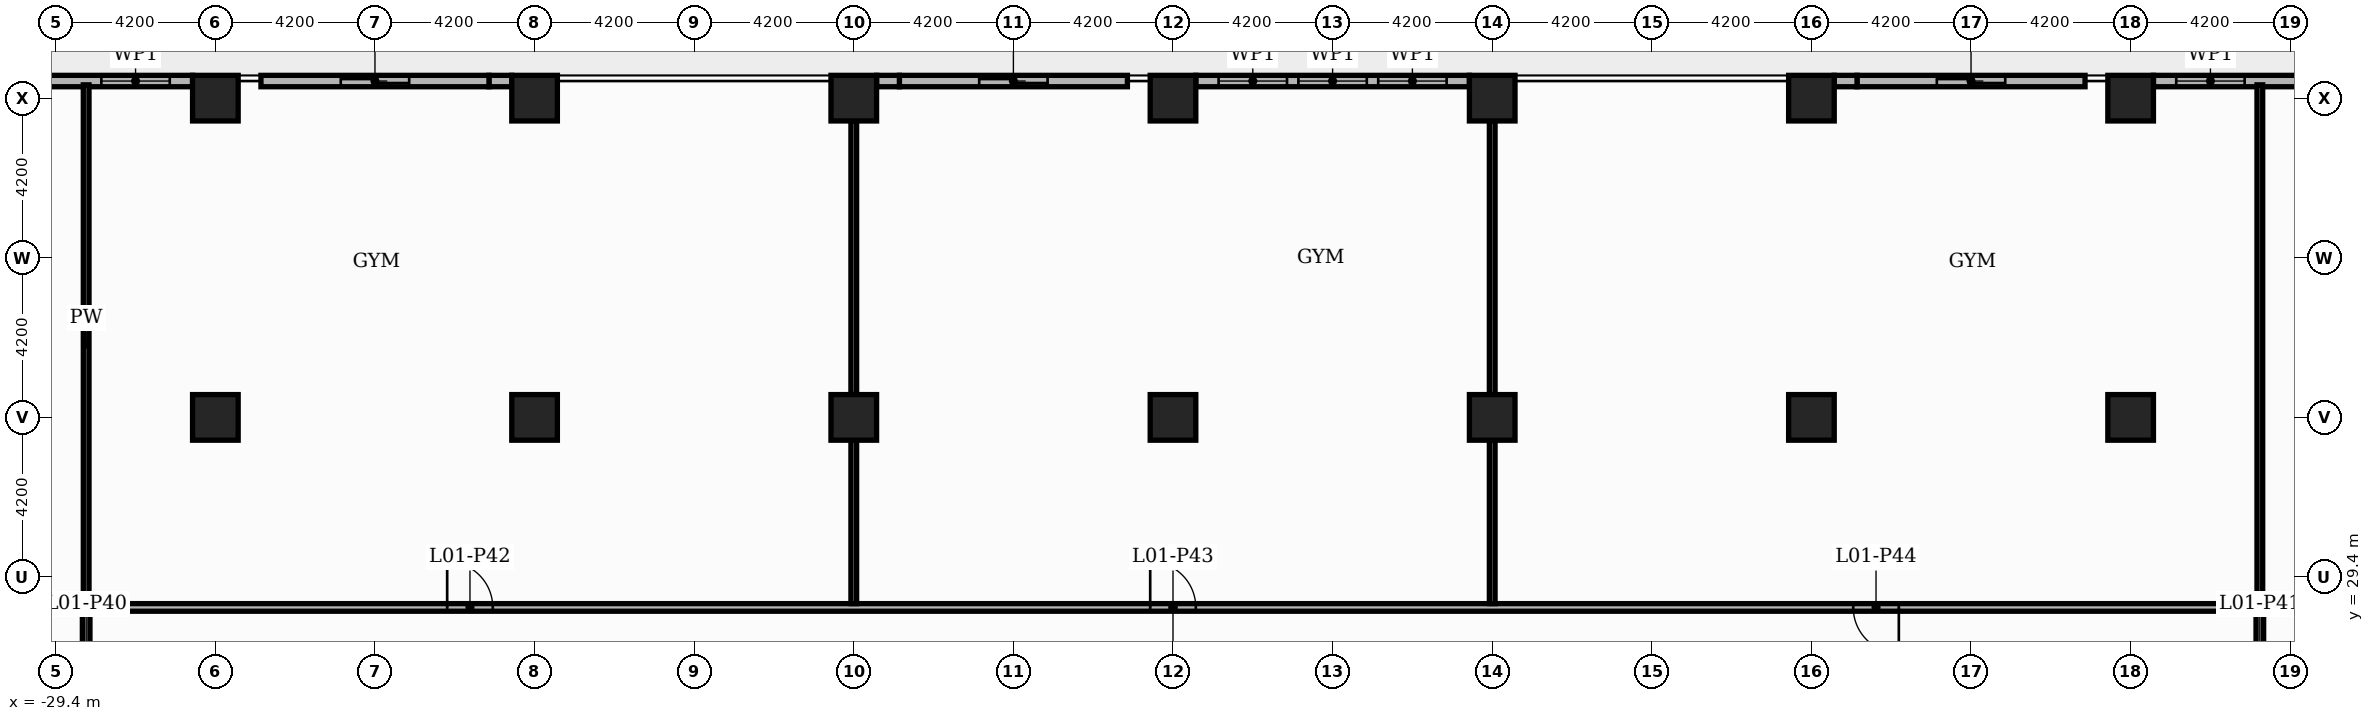
"""IFC4 building model, lengths in metres.
Left out: names, types, materials, properties, quantities, classifications, styles, units other than length and angle.
Written with IfcOpenShell. Run it as: python <this file> out.ifc"""

import sys

from ifc_helpers import new_model, si_unit, direction, frame, frame_2d, origin, origin_2d, place, context, subcontext, project, spatial, rectangle, extrude, element, fill, save


model = new_model("IFC4")
c1 = context("Model", 3, precision=1e-05, world=origin(), true_north=direction((0.0, 1.0)))
c2 = subcontext(c1, "Body", "Model", "MODEL_VIEW")
j1 = project(units=[si_unit("LENGTHUNIT", "METRE"), si_unit("PLANEANGLEUNIT", "RADIAN")], contexts=[c1])
p1 = place(None, origin())
s1 = spatial("IfcSite", under=j1, at=p1, CompositionType="ELEMENT")
p2 = place(p1, origin())
s2 = spatial("IfcBuilding", under=s1, at=p2, CompositionType="ELEMENT")
p3 = place(p2, frame((0.0, 0.0, 7.2)))
s3 = spatial("IfcBuildingStorey", under=s2, at=p3, CompositionType="ELEMENT", Elevation=7.2)
for number, where, z_axis, x_axis in (
    (1, (0.0, 33.6, 0.0), (0.0, 0.0, 1.0), (1.0, 0.0, 0.0)),
    (2, (0.0, 42.0, 0.0), (0.0, 0.0, 1.0), (1.0, 0.0, 0.0)),
    (3, (8.4, 33.6, 0.0), (0.0, 0.0, 1.0), (1.0, 0.0, 0.0)),
    (4, (8.4, 42.0, 0.0), (0.0, 0.0, 1.0), (1.0, 0.0, 0.0)),
    (5, (16.8, 33.6, 0.0), (0.0, 0.0, 1.0), (1.0, 0.0, 0.0)),
    (6, (16.8, 42.0, 0.0), (0.0, 0.0, 1.0), (1.0, 0.0, 0.0)),
    (7, (25.2, 33.6, 0.0), (0.0, 0.0, 1.0), (1.0, 0.0, 0.0)),
    (8, (25.2, 42.0, 0.0), (0.0, 0.0, 1.0), (1.0, 0.0, 0.0)),
    (9, (-8.4, 33.6, 0.0), (0.0, 0.0, 1.0), (1.0, 0.0, 0.0)),
    (10, (-8.4, 42.0, 0.0), (0.0, 0.0, 1.0), (1.0, 0.0, 0.0)),
    (11, (-16.8, 33.6, 0.0), (0.0, 0.0, 1.0), (1.0, 0.0, 0.0)),
    (12, (-16.8, 42.0, 0.0), (0.0, 0.0, 1.0), (1.0, 0.0, 0.0)),
    (13, (-25.2, 33.6, 0.0), (0.0, 0.0, 1.0), (1.0, 0.0, 0.0)),
    (14, (-25.2, 42.0, 0.0), (0.0, 0.0, 1.0), (1.0, 0.0, 0.0)),
):
    element("IfcColumn", number, at=place(p3, frame(where, z_axis=z_axis, x_axis=x_axis)), inside=s3, PredefinedType="COLUMN", context=c2, shape_type="SweptSolid", body=[
        extrude(rectangle(XDim=1.2, YDim=1.2, at=origin_2d()), origin(), (0.0, 0.0, 1.0), 4.8),
    ])
p4 = place(p3, frame((33.0, 42.45, 0.0), z_axis=(0.0, 0.0, 1.0), x_axis=(-1.0, 0.0, 0.0)))
e15 = element("IfcWall", 15, at=p4, inside=s3, PredefinedType="STANDARD", context=c2, shape_type="SweptSolid", body=[
    extrude(rectangle(XDim=7.2, YDim=0.3, at=frame_2d((3.6, 0.0))), origin(), (0.0, 0.0, 1.0), 4.38),
])
p5 = place(p4, frame((0.6, 0.0, 0.6)))
e16 = element("IfcOpeningElement", 16, at=p5, cuts=e15, PredefinedType="OPENING", context=c2, shape_type="SweptSolid", body=[
    extrude(rectangle(XDim=1.8, YDim=3.0, at=frame_2d((0.9, 1.5))), frame((0.0, 0.16, 0.0), z_axis=(0.0, -1.0, 0.0), x_axis=(1.0, 0.0, 0.0)), (0.0, 0.0, 1.0), 0.32),
])
p6 = place(p4, frame((4.8, 0.0, 0.6)))
e17 = element("IfcOpeningElement", 17, at=p6, cuts=e15, PredefinedType="OPENING", context=c2, shape_type="SweptSolid", body=[
    extrude(rectangle(XDim=1.8, YDim=3.0, at=frame_2d((0.9, 1.5))), frame((0.0, 0.16, 0.0), z_axis=(0.0, -1.0, 0.0), x_axis=(1.0, 0.0, 0.0)), (0.0, 0.0, 1.0), 0.32),
])
p7 = place(p3, frame((24.0, 42.45, 0.0), z_axis=(0.0, 0.0, 1.0), x_axis=(-1.0, 0.0, 0.0)))
e18 = element("IfcWall", 18, at=p7, inside=s3, PredefinedType="STANDARD", context=c2, shape_type="SweptSolid", body=[
    extrude(rectangle(XDim=6.0, YDim=0.3, at=frame_2d((3.0, 0.0))), origin(), (0.0, 0.0, 1.0), 4.38),
])
p8 = place(p7, frame((2.1, 0.0, 0.0)))
e19 = element("IfcOpeningElement", 19, at=p8, cuts=e18, PredefinedType="OPENING", context=c2, shape_type="SweptSolid", body=[
    extrude(rectangle(XDim=1.8, YDim=2.4, at=frame_2d((0.9, 1.2))), frame((0.0, 0.16, 0.0), z_axis=(0.0, -1.0, 0.0), x_axis=(1.0, 0.0, 0.0)), (0.0, 0.0, 1.0), 0.32),
])
p9 = place(p3, frame((18.0, 42.45, 0.0), z_axis=(0.0, 0.0, 1.0), x_axis=(-1.0, 0.0, 0.0)))
e20 = element("IfcWall", 20, at=p9, inside=s3, PredefinedType="STANDARD", context=c2, shape_type="SweptSolid", body=[
    extrude(rectangle(XDim=0.6, YDim=0.3, at=frame_2d((0.3, 0.0))), origin(), (0.0, 0.0, 1.0), 4.38),
])
p10 = place(p3, frame((7.8, 42.45, 0.0), z_axis=(0.0, 0.0, 1.0), x_axis=(-1.0, 0.0, 0.0)))
e21 = element("IfcWall", 21, at=p10, inside=s3, PredefinedType="STANDARD", context=c2, shape_type="SweptSolid", body=[
    extrude(rectangle(XDim=7.2, YDim=0.3, at=frame_2d((3.6, 0.0))), origin(), (0.0, 0.0, 1.0), 4.38),
])
p11 = place(p10, frame((0.6, 0.0, 0.6)))
e22 = element("IfcOpeningElement", 22, at=p11, cuts=e21, PredefinedType="OPENING", context=c2, shape_type="SweptSolid", body=[
    extrude(rectangle(XDim=1.8, YDim=3.0, at=frame_2d((0.9, 1.5))), frame((0.0, 0.16, 0.0), z_axis=(0.0, -1.0, 0.0), x_axis=(1.0, 0.0, 0.0)), (0.0, 0.0, 1.0), 0.32),
])
p12 = place(p10, frame((2.7, 0.0, 0.6)))
e23 = element("IfcOpeningElement", 23, at=p12, cuts=e21, PredefinedType="OPENING", context=c2, shape_type="SweptSolid", body=[
    extrude(rectangle(XDim=1.8, YDim=3.0, at=frame_2d((0.9, 1.5))), frame((0.0, 0.16, 0.0), z_axis=(0.0, -1.0, 0.0), x_axis=(1.0, 0.0, 0.0)), (0.0, 0.0, 1.0), 0.32),
])
p13 = place(p10, frame((4.8, 0.0, 0.6)))
e24 = element("IfcOpeningElement", 24, at=p13, cuts=e21, PredefinedType="OPENING", context=c2, shape_type="SweptSolid", body=[
    extrude(rectangle(XDim=1.8, YDim=3.0, at=frame_2d((0.9, 1.5))), frame((0.0, 0.16, 0.0), z_axis=(0.0, -1.0, 0.0), x_axis=(1.0, 0.0, 0.0)), (0.0, 0.0, 1.0), 0.32),
])
p14 = place(p3, frame((-1.2, 42.45, 0.0), z_axis=(0.0, 0.0, 1.0), x_axis=(-1.0, 0.0, 0.0)))
e25 = element("IfcWall", 25, at=p14, inside=s3, PredefinedType="STANDARD", context=c2, shape_type="SweptSolid", body=[
    extrude(rectangle(XDim=6.0, YDim=0.3, at=frame_2d((3.0, 0.0))), origin(), (0.0, 0.0, 1.0), 4.38),
])
p15 = place(p14, frame((2.1, 0.0, 0.0)))
e26 = element("IfcOpeningElement", 26, at=p15, cuts=e25, PredefinedType="OPENING", context=c2, shape_type="SweptSolid", body=[
    extrude(rectangle(XDim=1.8, YDim=2.4, at=frame_2d((0.9, 1.2))), frame((0.0, 0.16, 0.0), z_axis=(0.0, -1.0, 0.0), x_axis=(1.0, 0.0, 0.0)), (0.0, 0.0, 1.0), 0.32),
])
for number, where, z_axis, x_axis in (
    (27, (-7.2, 42.45, 0.0), (0.0, 0.0, 1.0), (-1.0, 0.0, 0.0)),
    (28, (-17.4, 42.45, 0.0), (0.0, 0.0, 1.0), (-1.0, 0.0, 0.0)),
):
    element("IfcWall", number, at=place(p3, frame(where, z_axis=z_axis, x_axis=x_axis)), inside=s3, PredefinedType="STANDARD", context=c2, shape_type="SweptSolid", body=[
        extrude(rectangle(XDim=0.6, YDim=0.3, at=frame_2d((0.3, 0.0))), origin(), (0.0, 0.0, 1.0), 4.38),
    ])
p16 = place(p3, frame((-18.0, 42.45, 0.0), z_axis=(0.0, 0.0, 1.0), x_axis=(-1.0, 0.0, 0.0)))
e29 = element("IfcWall", 29, at=p16, inside=s3, PredefinedType="STANDARD", context=c2, shape_type="SweptSolid", body=[
    extrude(rectangle(XDim=6.0, YDim=0.3, at=frame_2d((3.0, 0.0))), origin(), (0.0, 0.0, 1.0), 4.38),
])
p17 = place(p16, frame((2.1, 0.0, 0.0)))
e30 = element("IfcOpeningElement", 30, at=p17, cuts=e29, PredefinedType="OPENING", context=c2, shape_type="SweptSolid", body=[
    extrude(rectangle(XDim=1.8, YDim=2.4, at=frame_2d((0.9, 1.2))), frame((0.0, 0.16, 0.0), z_axis=(0.0, -1.0, 0.0), x_axis=(1.0, 0.0, 0.0)), (0.0, 0.0, 1.0), 0.32),
])
p18 = place(p3, frame((-25.8, 42.45, 0.0), z_axis=(0.0, 0.0, 1.0), x_axis=(-1.0, 0.0, 0.0)))
e31 = element("IfcWall", 31, at=p18, inside=s3, PredefinedType="STANDARD", context=c2, shape_type="SweptSolid", body=[
    extrude(rectangle(XDim=7.2, YDim=0.3, at=frame_2d((3.6, 0.0))), origin(), (0.0, 0.0, 1.0), 4.38),
])
p19 = place(p18, frame((0.6, 0.0, 0.6)))
e32 = element("IfcOpeningElement", 32, at=p19, cuts=e31, PredefinedType="OPENING", context=c2, shape_type="SweptSolid", body=[
    extrude(rectangle(XDim=1.8, YDim=3.0, at=frame_2d((0.9, 1.5))), frame((0.0, 0.16, 0.0), z_axis=(0.0, -1.0, 0.0), x_axis=(1.0, 0.0, 0.0)), (0.0, 0.0, 1.0), 0.32),
])
p20 = place(p18, frame((4.8, 0.0, 0.6)))
e33 = element("IfcOpeningElement", 33, at=p20, cuts=e31, PredefinedType="OPENING", context=c2, shape_type="SweptSolid", body=[
    extrude(rectangle(XDim=1.8, YDim=3.0, at=frame_2d((0.9, 1.5))), frame((0.0, 0.16, 0.0), z_axis=(0.0, -1.0, 0.0), x_axis=(1.0, 0.0, 0.0)), (0.0, 0.0, 1.0), 0.32),
])
p21 = place(p3, frame((-28.7, 28.6, 0.0), z_axis=(0.0, 0.0, 1.0), x_axis=(1.0, 0.0, 0.0)))
e34 = element("IfcWall", 34, at=p21, inside=s3, PredefinedType="PARTITIONING", context=c2, shape_type="SweptSolid", body=[
    extrude(rectangle(XDim=57.4, YDim=0.2, at=frame_2d((28.7, 0.0))), origin(), (0.0, 0.0, 1.0), 3.98),
])
p22 = place(p21, frame((9.6, 0.0, 0.0)))
e35 = element("IfcOpeningElement", 35, at=p22, cuts=e34, PredefinedType="OPENING", context=c2, shape_type="SweptSolid", body=[
    extrude(rectangle(XDim=1.2, YDim=2.2, at=frame_2d((0.6, 1.1))), frame((0.0, 0.11, 0.0), z_axis=(0.0, -1.0, 0.0), x_axis=(1.0, 0.0, 0.0)), (0.0, 0.0, 1.0), 0.22),
])
p23 = place(p21, frame((28.1, 0.0, 0.0)))
e36 = element("IfcOpeningElement", 36, at=p23, cuts=e34, PredefinedType="OPENING", context=c2, shape_type="SweptSolid", body=[
    extrude(rectangle(XDim=1.2, YDim=2.2, at=frame_2d((0.6, 1.1))), frame((0.0, 0.11, 0.0), z_axis=(0.0, -1.0, 0.0), x_axis=(1.0, 0.0, 0.0)), (0.0, 0.0, 1.0), 0.22),
])
p24 = place(p21, frame((46.6, 0.0, 0.0)))
e37 = element("IfcOpeningElement", 37, at=p24, cuts=e34, PredefinedType="OPENING", context=c2, shape_type="SweptSolid", body=[
    extrude(rectangle(XDim=1.2, YDim=2.2, at=frame_2d((0.6, 1.1))), frame((0.0, 0.11, 0.0), z_axis=(0.0, -1.0, 0.0), x_axis=(1.0, 0.0, 0.0)), (0.0, 0.0, 1.0), 0.22),
])
p25 = place(p3, frame((-28.6, 24.7, 0.0), z_axis=(0.0, 0.0, 1.0), x_axis=(0.0, 1.0, 0.0)))
e38 = element("IfcWall", 38, at=p25, inside=s3, PredefinedType="PARTITIONING", context=c2, shape_type="SweptSolid", body=[
    extrude(rectangle(XDim=3.8, YDim=0.2, at=frame_2d((1.9, 0.0))), origin(), (0.0, 0.0, 1.0), 4.08),
])
p26 = place(p25, frame((1.3, 0.0, 0.0)))
e39 = element("IfcOpeningElement", 39, at=p26, cuts=e38, PredefinedType="OPENING", context=c2, shape_type="SweptSolid", body=[
    extrude(rectangle(XDim=1.2, YDim=2.2, at=frame_2d((0.6, 1.1))), frame((0.0, 0.11, 0.0), z_axis=(0.0, -1.0, 0.0), x_axis=(1.0, 0.0, 0.0)), (0.0, 0.0, 1.0), 0.22),
])
p27 = place(p3, frame((-28.6, 28.7, 0.0), z_axis=(0.0, 0.0, 1.0), x_axis=(0.0, 1.0, 0.0)))
e40 = element("IfcWall", 40, at=p27, inside=s3, PredefinedType="PARTITIONING", context=c2, shape_type="SweptSolid", body=[
    extrude(rectangle(XDim=13.65, YDim=0.15, at=frame_2d((6.825, 0.0))), origin(), (0.0, 0.0, 1.0), 4.08),
])
p28 = place(p3, frame((-8.4, 28.7, 0.0), z_axis=(0.0, 0.0, 1.0), x_axis=(0.0, 1.0, 0.0)))
e41 = element("IfcWall", 41, at=p28, inside=s3, PredefinedType="PARTITIONING", context=c2, shape_type="SweptSolid", body=[
    extrude(rectangle(XDim=4.3, YDim=0.15, at=frame_2d((2.15, 0.0))), origin(), (0.0, 0.0, 1.0), 3.98),
])
p29 = place(p3, frame((-8.4, 34.2, 0.0), z_axis=(0.0, 0.0, 1.0), x_axis=(0.0, 1.0, 0.0)))
e42 = element("IfcWall", 42, at=p29, inside=s3, PredefinedType="PARTITIONING", context=c2, shape_type="SweptSolid", body=[
    extrude(rectangle(XDim=7.2, YDim=0.15, at=frame_2d((3.6, 0.0))), origin(), (0.0, 0.0, 1.0), 3.98),
])
p30 = place(p3, frame((8.4, 28.7, 0.0), z_axis=(0.0, 0.0, 1.0), x_axis=(0.0, 1.0, 0.0)))
e43 = element("IfcWall", 43, at=p30, inside=s3, PredefinedType="PARTITIONING", context=c2, shape_type="SweptSolid", body=[
    extrude(rectangle(XDim=4.3, YDim=0.15, at=frame_2d((2.15, 0.0))), origin(), (0.0, 0.0, 1.0), 3.98),
])
p31 = place(p3, frame((8.4, 34.2, 0.0), z_axis=(0.0, 0.0, 1.0), x_axis=(0.0, 1.0, 0.0)))
e44 = element("IfcWall", 44, at=p31, inside=s3, PredefinedType="PARTITIONING", context=c2, shape_type="SweptSolid", body=[
    extrude(rectangle(XDim=7.2, YDim=0.15, at=frame_2d((3.6, 0.0))), origin(), (0.0, 0.0, 1.0), 3.98),
])
p32 = place(p3, frame((28.6, 24.7, 0.0), z_axis=(0.0, 0.0, 1.0), x_axis=(0.0, 1.0, 0.0)))
e45 = element("IfcWall", 45, at=p32, inside=s3, PredefinedType="PARTITIONING", context=c2, shape_type="SweptSolid", body=[
    extrude(rectangle(XDim=3.8, YDim=0.2, at=frame_2d((1.9, 0.0))), origin(), (0.0, 0.0, 1.0), 4.08),
])
p33 = place(p32, frame((1.3, 0.0, 0.0)))
e46 = element("IfcOpeningElement", 46, at=p33, cuts=e45, PredefinedType="OPENING", context=c2, shape_type="SweptSolid", body=[
    extrude(rectangle(XDim=1.2, YDim=2.2, at=frame_2d((0.6, 1.1))), frame((0.0, 0.11, 0.0), z_axis=(0.0, -1.0, 0.0), x_axis=(1.0, 0.0, 0.0)), (0.0, 0.0, 1.0), 0.22),
])
p34 = place(p3, frame((28.6, 28.7, 0.0), z_axis=(0.0, 0.0, 1.0), x_axis=(0.0, 1.0, 0.0)))
e47 = element("IfcWall", 47, at=p34, inside=s3, PredefinedType="PARTITIONING", context=c2, shape_type="SweptSolid", body=[
    extrude(rectangle(XDim=13.65, YDim=0.15, at=frame_2d((6.825, 0.0))), origin(), (0.0, 0.0, 1.0), 4.08),
])
p35 = place(p6, origin())
e48 = element("IfcWindow", 48, at=p35, inside=s3, PartitioningType="SINGLE_PANEL", PredefinedType="WINDOW", context=c2, shape_type="SweptSolid", body=[
    extrude(rectangle(XDim=1.8, YDim=3.0, at=frame_2d((0.9, 1.5))), frame((0.0, 0.03, 0.0), z_axis=(0.0, -1.0, 0.0), x_axis=(1.0, 0.0, 0.0)), (0.0, 0.0, 1.0), 0.06),
])
fill(e17, e48)
p36 = place(p8, origin())
e49 = element("IfcDoor", 49, at=p36, inside=s3, OperationType="SLIDING_TO_LEFT", PredefinedType="DOOR", context=c2, shape_type="SweptSolid", body=[
    extrude(rectangle(XDim=1.8, YDim=2.4, at=frame_2d((0.9, 1.2))), frame((0.0, 0.025, 0.0), z_axis=(0.0, -1.0, 0.0), x_axis=(1.0, 0.0, 0.0)), (0.0, 0.0, 1.0), 0.05),
])
fill(e19, e49)
p37 = place(p11, origin())
e50 = element("IfcWindow", 50, at=p37, inside=s3, PartitioningType="SINGLE_PANEL", PredefinedType="WINDOW", context=c2, shape_type="SweptSolid", body=[
    extrude(rectangle(XDim=1.8, YDim=3.0, at=frame_2d((0.9, 1.5))), frame((0.0, 0.03, 0.0), z_axis=(0.0, -1.0, 0.0), x_axis=(1.0, 0.0, 0.0)), (0.0, 0.0, 1.0), 0.06),
])
fill(e22, e50)
p38 = place(p12, origin())
e51 = element("IfcWindow", 51, at=p38, inside=s3, PartitioningType="SINGLE_PANEL", PredefinedType="WINDOW", context=c2, shape_type="SweptSolid", body=[
    extrude(rectangle(XDim=1.8, YDim=3.0, at=frame_2d((0.9, 1.5))), frame((0.0, 0.03, 0.0), z_axis=(0.0, -1.0, 0.0), x_axis=(1.0, 0.0, 0.0)), (0.0, 0.0, 1.0), 0.06),
])
fill(e23, e51)
p39 = place(p13, origin())
e52 = element("IfcWindow", 52, at=p39, inside=s3, PartitioningType="SINGLE_PANEL", PredefinedType="WINDOW", context=c2, shape_type="SweptSolid", body=[
    extrude(rectangle(XDim=1.8, YDim=3.0, at=frame_2d((0.9, 1.5))), frame((0.0, 0.03, 0.0), z_axis=(0.0, -1.0, 0.0), x_axis=(1.0, 0.0, 0.0)), (0.0, 0.0, 1.0), 0.06),
])
fill(e24, e52)
p40 = place(p15, origin())
e53 = element("IfcDoor", 53, at=p40, inside=s3, OperationType="SLIDING_TO_LEFT", PredefinedType="DOOR", context=c2, shape_type="SweptSolid", body=[
    extrude(rectangle(XDim=1.8, YDim=2.4, at=frame_2d((0.9, 1.2))), frame((0.0, 0.025, 0.0), z_axis=(0.0, -1.0, 0.0), x_axis=(1.0, 0.0, 0.0)), (0.0, 0.0, 1.0), 0.05),
])
fill(e26, e53)
p41 = place(p17, origin())
e54 = element("IfcDoor", 54, at=p41, inside=s3, OperationType="SLIDING_TO_LEFT", PredefinedType="DOOR", context=c2, shape_type="SweptSolid", body=[
    extrude(rectangle(XDim=1.8, YDim=2.4, at=frame_2d((0.9, 1.2))), frame((0.0, 0.025, 0.0), z_axis=(0.0, -1.0, 0.0), x_axis=(1.0, 0.0, 0.0)), (0.0, 0.0, 1.0), 0.05),
])
fill(e30, e54)
p42 = place(p19, origin())
e55 = element("IfcWindow", 55, at=p42, inside=s3, PartitioningType="SINGLE_PANEL", PredefinedType="WINDOW", context=c2, shape_type="SweptSolid", body=[
    extrude(rectangle(XDim=1.8, YDim=3.0, at=frame_2d((0.9, 1.5))), frame((0.0, 0.03, 0.0), z_axis=(0.0, -1.0, 0.0), x_axis=(1.0, 0.0, 0.0)), (0.0, 0.0, 1.0), 0.06),
])
fill(e32, e55)
p43 = place(p22, origin())
e56 = element("IfcDoor", 56, at=p43, inside=s3, OperationType="SINGLE_SWING_LEFT", PredefinedType="DOOR", context=c2, shape_type="SweptSolid", body=[
    extrude(rectangle(XDim=1.2, YDim=2.2, at=frame_2d((0.6, 1.1))), frame((0.0, 0.025, 0.0), z_axis=(0.0, -1.0, 0.0), x_axis=(1.0, 0.0, 0.0)), (0.0, 0.0, 1.0), 0.05),
])
fill(e35, e56)
p44 = place(p23, origin())
e57 = element("IfcDoor", 57, at=p44, inside=s3, OperationType="SINGLE_SWING_LEFT", PredefinedType="DOOR", context=c2, shape_type="SweptSolid", body=[
    extrude(rectangle(XDim=1.2, YDim=2.2, at=frame_2d((0.6, 1.1))), frame((0.0, 0.025, 0.0), z_axis=(0.0, -1.0, 0.0), x_axis=(1.0, 0.0, 0.0)), (0.0, 0.0, 1.0), 0.05),
])
fill(e36, e57)
p45 = place(p24, origin())
e58 = element("IfcDoor", 58, at=p45, inside=s3, OperationType="SINGLE_SWING_RIGHT", PredefinedType="DOOR", context=c2, shape_type="SweptSolid", body=[
    extrude(rectangle(XDim=1.2, YDim=2.2, at=frame_2d((0.6, 1.1))), frame((0.0, 0.025, 0.0), z_axis=(0.0, -1.0, 0.0), x_axis=(1.0, 0.0, 0.0)), (0.0, 0.0, 1.0), 0.05),
])
fill(e37, e58)
save(model, sys.argv[1])
